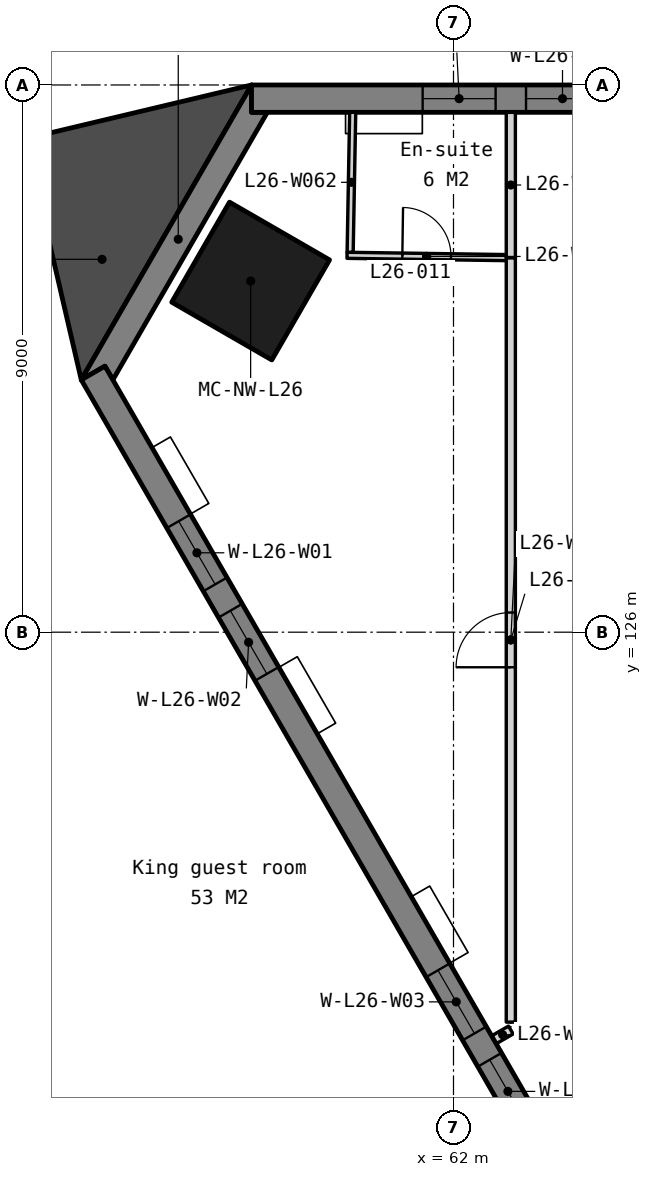
"""IFC4 building model, lengths in metres.
Left out: names, types, materials, properties, quantities, classifications, styles, units other than length and angle.
Written with IfcOpenShell. Run it as: python <this file> out.ifc"""

import sys

from ifc_helpers import new_model, si_unit, direction, frame, frame_2d, origin, origin_2d, place, context, subcontext, project, spatial, polyline, rectangle, outline, extrude, element, fill, save


model = new_model("IFC4")
c1 = context("Model", 3, precision=1e-05, world=origin(), true_north=direction((0.0, 1.0)))
c2 = subcontext(c1, "Body", "Model", "MODEL_VIEW")
j1 = project(units=[si_unit("LENGTHUNIT", "METRE"), si_unit("PLANEANGLEUNIT", "RADIAN")], contexts=[c1])
p1 = place(None, origin())
s1 = spatial("IfcSite", under=j1, at=p1, CompositionType="ELEMENT")
p2 = place(p1, origin())
s2 = spatial("IfcBuilding", under=s1, at=p2, CompositionType="ELEMENT")
p3 = place(p2, frame((0.0, 0.0, 106.3)))
s3 = spatial("IfcBuildingStorey", under=s2, at=p3, CompositionType="ELEMENT", Elevation=106.3)
p4 = place(p3, frame((58.664, 131.775, 0.0), z_axis=(0.0, 0.0, 1.0), x_axis=(-0.5, -0.866025403784, 0.0)))
e1 = element("IfcColumn", 1, at=p4, inside=s3, PredefinedType="COLUMN", context=c2, shape_type="SweptSolid", body=[
    extrude(rectangle(XDim=1.9, YDim=1.9, at=origin_2d()), origin(), (0.0, 0.0, 1.0), 3.5),
])
p5 = place(p3, frame((0.0, 0.0, -0.15)))
e2 = element("IfcWall", 2, at=p5, inside=s3, PredefinedType="SOLIDWALL", context=c2, shape_type="SweptSolid", body=[
    extrude(outline(polyline([(58.678, 135.0), (58.678, 134.55), (58.938, 134.55), (56.398, 130.15), (56.268, 130.375), (55.878, 130.15), (58.678, 135.0)])), origin(), (0.0, 0.0, 1.0), 3.5),
])
p6 = place(p3, frame((101.322, 134.775, -0.15), z_axis=(0.0, 0.0, 1.0), x_axis=(-1.0, 0.0, 0.0)))
e3 = element("IfcWall", 3, at=p6, inside=s3, PredefinedType="SOLIDWALL", context=c2, shape_type="SweptSolid", body=[
    extrude(outline(polyline([(42.643, 0.0), (42.643, 3.5), (0.0, 3.5), (0.0, 0.0), (42.643, 0.0)])), frame((0.0, 0.225, 0.0), z_axis=(0.0, -1.0, 0.0), x_axis=(1.0, 0.0, 0.0)), (0.0, 0.0, 1.0), 0.45),
])
p7 = place(p6, frame((2.814, 0.0, 1.05)))
e4 = element("IfcOpeningElement", 4, at=p7, cuts=e3, PredefinedType="OPENING", context=c2, shape_type="SweptSolid", body=[
    extrude(rectangle(XDim=1.2, YDim=1.5, at=frame_2d((0.6, 0.75))), frame((0.0, 0.235, 0.0), z_axis=(0.0, -1.0, 0.0), x_axis=(1.0, 0.0, 0.0)), (0.0, 0.0, 1.0), 0.47),
])
p8 = place(p6, frame((4.514, 0.0, 1.05)))
e5 = element("IfcOpeningElement", 5, at=p8, cuts=e3, PredefinedType="OPENING", context=c2, shape_type="SweptSolid", body=[
    extrude(rectangle(XDim=1.2, YDim=1.5, at=frame_2d((0.6, 0.75))), frame((0.0, 0.235, 0.0), z_axis=(0.0, -1.0, 0.0), x_axis=(1.0, 0.0, 0.0)), (0.0, 0.0, 1.0), 0.47),
])
p9 = place(p6, frame((11.343, 0.0, 1.05)))
e6 = element("IfcOpeningElement", 6, at=p9, cuts=e3, PredefinedType="OPENING", context=c2, shape_type="SweptSolid", body=[
    extrude(rectangle(XDim=1.2, YDim=1.5, at=frame_2d((0.6, 0.75))), frame((0.0, 0.235, 0.0), z_axis=(0.0, -1.0, 0.0), x_axis=(1.0, 0.0, 0.0)), (0.0, 0.0, 1.0), 0.47),
])
p10 = place(p6, frame((13.043, 0.0, 1.05)))
e7 = element("IfcOpeningElement", 7, at=p10, cuts=e3, PredefinedType="OPENING", context=c2, shape_type="SweptSolid", body=[
    extrude(rectangle(XDim=1.2, YDim=1.5, at=frame_2d((0.6, 0.75))), frame((0.0, 0.235, 0.0), z_axis=(0.0, -1.0, 0.0), x_axis=(1.0, 0.0, 0.0)), (0.0, 0.0, 1.0), 0.47),
])
p11 = place(p6, frame((19.872, 0.0, 1.05)))
e8 = element("IfcOpeningElement", 8, at=p11, cuts=e3, PredefinedType="OPENING", context=c2, shape_type="SweptSolid", body=[
    extrude(rectangle(XDim=1.2, YDim=1.5, at=frame_2d((0.6, 0.75))), frame((0.0, 0.235, 0.0), z_axis=(0.0, -1.0, 0.0), x_axis=(1.0, 0.0, 0.0)), (0.0, 0.0, 1.0), 0.47),
])
p12 = place(p6, frame((21.572, 0.0, 1.05)))
e9 = element("IfcOpeningElement", 9, at=p12, cuts=e3, PredefinedType="OPENING", context=c2, shape_type="SweptSolid", body=[
    extrude(rectangle(XDim=1.2, YDim=1.5, at=frame_2d((0.6, 0.75))), frame((0.0, 0.235, 0.0), z_axis=(0.0, -1.0, 0.0), x_axis=(1.0, 0.0, 0.0)), (0.0, 0.0, 1.0), 0.47),
])
p13 = place(p6, frame((28.4, 0.0, 1.05)))
e10 = element("IfcOpeningElement", 10, at=p13, cuts=e3, PredefinedType="OPENING", context=c2, shape_type="SweptSolid", body=[
    extrude(rectangle(XDim=1.2, YDim=1.5, at=frame_2d((0.6, 0.75))), frame((0.0, 0.235, 0.0), z_axis=(0.0, -1.0, 0.0), x_axis=(1.0, 0.0, 0.0)), (0.0, 0.0, 1.0), 0.47),
])
p14 = place(p6, frame((30.1, 0.0, 1.05)))
e11 = element("IfcOpeningElement", 11, at=p14, cuts=e3, PredefinedType="OPENING", context=c2, shape_type="SweptSolid", body=[
    extrude(rectangle(XDim=1.2, YDim=1.5, at=frame_2d((0.6, 0.75))), frame((0.0, 0.235, 0.0), z_axis=(0.0, -1.0, 0.0), x_axis=(1.0, 0.0, 0.0)), (0.0, 0.0, 1.0), 0.47),
])
p15 = place(p6, frame((36.929, 0.0, 1.05)))
e12 = element("IfcOpeningElement", 12, at=p15, cuts=e3, PredefinedType="OPENING", context=c2, shape_type="SweptSolid", body=[
    extrude(rectangle(XDim=1.2, YDim=1.5, at=frame_2d((0.6, 0.75))), frame((0.0, 0.235, 0.0), z_axis=(0.0, -1.0, 0.0), x_axis=(1.0, 0.0, 0.0)), (0.0, 0.0, 1.0), 0.47),
])
p16 = place(p6, frame((38.629, 0.0, 1.05)))
e13 = element("IfcOpeningElement", 13, at=p16, cuts=e3, PredefinedType="OPENING", context=c2, shape_type="SweptSolid", body=[
    extrude(rectangle(XDim=1.2, YDim=1.5, at=frame_2d((0.6, 0.75))), frame((0.0, 0.235, 0.0), z_axis=(0.0, -1.0, 0.0), x_axis=(1.0, 0.0, 0.0)), (0.0, 0.0, 1.0), 0.47),
])
p17 = place(p3, frame((56.073, 130.263, -0.15), z_axis=(0.0, 0.0, 1.0), x_axis=(0.500000478905, -0.866025127289, 0.0)))
e14 = element("IfcWall", 14, at=p17, inside=s3, PredefinedType="SOLIDWALL", context=c2, shape_type="SweptSolid", body=[
    extrude(outline(polyline([(42.643, 0.0), (42.643, 3.5), (0.0, 3.5), (0.0, 0.0), (42.643, 0.0)])), frame((0.0, 0.225, 0.0), z_axis=(0.0, -1.0, 0.0), x_axis=(1.0, 0.0, 0.0)), (0.0, 0.0, 1.0), 0.45),
])
p18 = place(p17, frame((2.814, 0.0, 1.05)))
e15 = element("IfcOpeningElement", 15, at=p18, cuts=e14, PredefinedType="OPENING", context=c2, shape_type="SweptSolid", body=[
    extrude(rectangle(XDim=1.2, YDim=1.5, at=frame_2d((0.6, 0.75))), frame((0.0, 0.235, 0.0), z_axis=(0.0, -1.0, 0.0), x_axis=(1.0, 0.0, 0.0)), (0.0, 0.0, 1.0), 0.47),
])
p19 = place(p17, frame((4.514, 0.0, 1.05)))
e16 = element("IfcOpeningElement", 16, at=p19, cuts=e14, PredefinedType="OPENING", context=c2, shape_type="SweptSolid", body=[
    extrude(rectangle(XDim=1.2, YDim=1.5, at=frame_2d((0.6, 0.75))), frame((0.0, 0.235, 0.0), z_axis=(0.0, -1.0, 0.0), x_axis=(1.0, 0.0, 0.0)), (0.0, 0.0, 1.0), 0.47),
])
p20 = place(p17, frame((11.343, 0.0, 1.05)))
e17 = element("IfcOpeningElement", 17, at=p20, cuts=e14, PredefinedType="OPENING", context=c2, shape_type="SweptSolid", body=[
    extrude(rectangle(XDim=1.2, YDim=1.5, at=frame_2d((0.6, 0.75))), frame((0.0, 0.235, 0.0), z_axis=(0.0, -1.0, 0.0), x_axis=(1.0, 0.0, 0.0)), (0.0, 0.0, 1.0), 0.47),
])
p21 = place(p17, frame((13.043, 0.0, 1.05)))
e18 = element("IfcOpeningElement", 18, at=p21, cuts=e14, PredefinedType="OPENING", context=c2, shape_type="SweptSolid", body=[
    extrude(rectangle(XDim=1.2, YDim=1.5, at=frame_2d((0.6, 0.75))), frame((0.0, 0.235, 0.0), z_axis=(0.0, -1.0, 0.0), x_axis=(1.0, 0.0, 0.0)), (0.0, 0.0, 1.0), 0.47),
])
p22 = place(p17, frame((19.872, 0.0, 1.05)))
e19 = element("IfcOpeningElement", 19, at=p22, cuts=e14, PredefinedType="OPENING", context=c2, shape_type="SweptSolid", body=[
    extrude(rectangle(XDim=1.2, YDim=1.5, at=frame_2d((0.6, 0.75))), frame((0.0, 0.235, 0.0), z_axis=(0.0, -1.0, 0.0), x_axis=(1.0, 0.0, 0.0)), (0.0, 0.0, 1.0), 0.47),
])
p23 = place(p17, frame((21.572, 0.0, 1.05)))
e20 = element("IfcOpeningElement", 20, at=p23, cuts=e14, PredefinedType="OPENING", context=c2, shape_type="SweptSolid", body=[
    extrude(rectangle(XDim=1.2, YDim=1.5, at=frame_2d((0.6, 0.75))), frame((0.0, 0.235, 0.0), z_axis=(0.0, -1.0, 0.0), x_axis=(1.0, 0.0, 0.0)), (0.0, 0.0, 1.0), 0.47),
])
p24 = place(p17, frame((28.4, 0.0, 1.05)))
e21 = element("IfcOpeningElement", 21, at=p24, cuts=e14, PredefinedType="OPENING", context=c2, shape_type="SweptSolid", body=[
    extrude(rectangle(XDim=1.2, YDim=1.5, at=frame_2d((0.6, 0.75))), frame((0.0, 0.235, 0.0), z_axis=(0.0, -1.0, 0.0), x_axis=(1.0, 0.0, 0.0)), (0.0, 0.0, 1.0), 0.47),
])
p25 = place(p17, frame((30.1, 0.0, 1.05)))
e22 = element("IfcOpeningElement", 22, at=p25, cuts=e14, PredefinedType="OPENING", context=c2, shape_type="SweptSolid", body=[
    extrude(rectangle(XDim=1.2, YDim=1.5, at=frame_2d((0.6, 0.75))), frame((0.0, 0.235, 0.0), z_axis=(0.0, -1.0, 0.0), x_axis=(1.0, 0.0, 0.0)), (0.0, 0.0, 1.0), 0.47),
])
p26 = place(p17, frame((36.929, 0.0, 1.05)))
e23 = element("IfcOpeningElement", 23, at=p26, cuts=e14, PredefinedType="OPENING", context=c2, shape_type="SweptSolid", body=[
    extrude(rectangle(XDim=1.2, YDim=1.5, at=frame_2d((0.6, 0.75))), frame((0.0, 0.235, 0.0), z_axis=(0.0, -1.0, 0.0), x_axis=(1.0, 0.0, 0.0)), (0.0, 0.0, 1.0), 0.47),
])
p27 = place(p17, frame((38.629, 0.0, 1.05)))
e24 = element("IfcOpeningElement", 24, at=p27, cuts=e14, PredefinedType="OPENING", context=c2, shape_type="SweptSolid", body=[
    extrude(rectangle(XDim=1.2, YDim=1.5, at=frame_2d((0.6, 0.75))), frame((0.0, 0.235, 0.0), z_axis=(0.0, -1.0, 0.0), x_axis=(1.0, 0.0, 0.0)), (0.0, 0.0, 1.0), 0.47),
])
p28 = place(p3, frame((0.0, 0.0, -0.15)))
e25 = element("IfcWall", 25, at=p28, inside=s3, PredefinedType="SOLIDWALL", context=c2, shape_type="SweptSolid", body=[
    extrude(outline(polyline([(58.678, 135.0), (54.958, 134.115), (55.878, 130.15), (58.678, 135.0)])), origin(), (0.0, 0.0, 1.0), 3.5),
])
p29 = place(p3, frame((62.673, 119.301, 0.0), z_axis=(0.0, 0.0, 1.0), x_axis=(0.866159461733, 0.499767732902, 0.0)))
e26 = element("IfcWall", 26, at=p29, inside=s3, PredefinedType="PARTITIONING", context=c2, shape_type="SweptSolid", body=[
    extrude(rectangle(XDim=0.311, YDim=0.15, at=frame_2d((0.156, 0.0))), origin(), (0.0, 0.0, 1.0), 3.35),
])
p30 = place(p3, frame((62.943, 119.587, 0.0), z_axis=(0.0, 0.0, 1.0), x_axis=(0.0, 1.0, 0.0)))
e27 = element("IfcWall", 27, at=p30, inside=s3, PredefinedType="PARTITIONING", context=c2, shape_type="SweptSolid", body=[
    extrude(rectangle(XDim=12.573, YDim=0.15, at=frame_2d((6.287, 0.0))), origin(), (0.0, 0.0, 1.0), 3.35),
])
p31 = place(p30, frame((5.836, 0.0, 0.0)))
e28 = element("IfcOpeningElement", 28, at=p31, cuts=e27, PredefinedType="OPENING", context=c2, shape_type="SweptSolid", body=[
    extrude(rectangle(XDim=0.9, YDim=2.1, at=frame_2d((0.45, 1.05))), frame((0.0, 0.085, 0.0), z_axis=(0.0, -1.0, 0.0), x_axis=(1.0, 0.0, 0.0)), (0.0, 0.0, 1.0), 0.17),
])
p32 = place(p3, frame((60.25, 132.198, 0.0), z_axis=(0.0, 0.0, 1.0), x_axis=(0.999895563634, -0.014452052626, 0.0)))
e29 = element("IfcWall", 29, at=p32, inside=s3, PredefinedType="PARTITIONING", context=c2, shape_type="SweptSolid", body=[
    extrude(rectangle(XDim=2.618, YDim=0.1, at=frame_2d((1.309, 0.0))), origin(), (0.0, 0.0, 1.0), 3.35),
])
p33 = place(p32, frame((0.909, 0.0, 0.0)))
e30 = element("IfcOpeningElement", 30, at=p33, cuts=e29, PredefinedType="OPENING", context=c2, shape_type="SweptSolid", body=[
    extrude(rectangle(XDim=0.8, YDim=2.1, at=frame_2d((0.4, 1.05))), frame((0.0, 0.06, 0.0), z_axis=(0.0, -1.0, 0.0), x_axis=(1.0, 0.0, 0.0)), (0.0, 0.0, 1.0), 0.12),
])
p34 = place(p3, frame((60.3, 132.248, 0.0), z_axis=(0.0, 0.0, 1.0), x_axis=(0.018236627382, 0.999833698883, 0.0)))
e31 = element("IfcWall", 31, at=p34, inside=s3, PredefinedType="PARTITIONING", context=c2, shape_type="SweptSolid", body=[
    extrude(rectangle(XDim=2.303, YDim=0.1, at=frame_2d((1.151, 0.0))), origin(), (0.0, 0.0, 1.0), 3.35),
])
p35 = place(p3, frame((62.943, 132.16, 0.0), z_axis=(0.0, 0.0, 1.0), x_axis=(0.0, 1.0, 0.0)))
e32 = element("IfcWall", 32, at=p35, inside=s3, PredefinedType="PARTITIONING", context=c2, shape_type="SweptSolid", body=[
    extrude(rectangle(XDim=2.39, YDim=0.15, at=frame_2d((1.195, 0.0))), origin(), (0.0, 0.0, 1.0), 3.35),
])
p36 = place(p15, origin())
e33 = element("IfcWindow", 33, at=p36, inside=s3, PartitioningType="SINGLE_PANEL", PredefinedType="WINDOW", context=c2, shape_type="SweptSolid", body=[
    extrude(rectangle(XDim=1.2, YDim=1.5, at=frame_2d((0.6, 0.75))), frame((0.0, 0.03, 0.0), z_axis=(0.0, -1.0, 0.0), x_axis=(1.0, 0.0, 0.0)), (0.0, 0.0, 1.0), 0.06),
])
fill(e12, e33)
p37 = place(p16, origin())
e34 = element("IfcWindow", 34, at=p37, inside=s3, PartitioningType="SINGLE_PANEL", PredefinedType="WINDOW", context=c2, shape_type="SweptSolid", body=[
    extrude(rectangle(XDim=1.2, YDim=1.5, at=frame_2d((0.6, 0.75))), frame((0.0, 0.03, 0.0), z_axis=(0.0, -1.0, 0.0), x_axis=(1.0, 0.0, 0.0)), (0.0, 0.0, 1.0), 0.06),
])
fill(e13, e34)
p38 = place(p18, origin())
e35 = element("IfcWindow", 35, at=p38, inside=s3, PartitioningType="SINGLE_PANEL", PredefinedType="WINDOW", context=c2, shape_type="SweptSolid", body=[
    extrude(rectangle(XDim=1.2, YDim=1.5, at=frame_2d((0.6, 0.75))), frame((0.0, 0.03, 0.0), z_axis=(0.0, -1.0, 0.0), x_axis=(1.0, 0.0, 0.0)), (0.0, 0.0, 1.0), 0.06),
])
fill(e15, e35)
p39 = place(p19, origin())
e36 = element("IfcWindow", 36, at=p39, inside=s3, PartitioningType="SINGLE_PANEL", PredefinedType="WINDOW", context=c2, shape_type="SweptSolid", body=[
    extrude(rectangle(XDim=1.2, YDim=1.5, at=frame_2d((0.6, 0.75))), frame((0.0, 0.03, 0.0), z_axis=(0.0, -1.0, 0.0), x_axis=(1.0, 0.0, 0.0)), (0.0, 0.0, 1.0), 0.06),
])
fill(e16, e36)
p40 = place(p20, origin())
e37 = element("IfcWindow", 37, at=p40, inside=s3, PartitioningType="SINGLE_PANEL", PredefinedType="WINDOW", context=c2, shape_type="SweptSolid", body=[
    extrude(rectangle(XDim=1.2, YDim=1.5, at=frame_2d((0.6, 0.75))), frame((0.0, 0.03, 0.0), z_axis=(0.0, -1.0, 0.0), x_axis=(1.0, 0.0, 0.0)), (0.0, 0.0, 1.0), 0.06),
])
fill(e17, e37)
p41 = place(p21, origin())
e38 = element("IfcWindow", 38, at=p41, inside=s3, PartitioningType="SINGLE_PANEL", PredefinedType="WINDOW", context=c2, shape_type="SweptSolid", body=[
    extrude(rectangle(XDim=1.2, YDim=1.5, at=frame_2d((0.6, 0.75))), frame((0.0, 0.03, 0.0), z_axis=(0.0, -1.0, 0.0), x_axis=(1.0, 0.0, 0.0)), (0.0, 0.0, 1.0), 0.06),
])
fill(e18, e38)
p42 = place(p31, origin())
e39 = element("IfcDoor", 39, at=p42, inside=s3, OperationType="SINGLE_SWING_LEFT", PredefinedType="DOOR", context=c2, shape_type="SweptSolid", body=[
    extrude(rectangle(XDim=0.9, YDim=2.1, at=frame_2d((0.45, 1.05))), frame((0.0, 0.025, 0.0), z_axis=(0.0, -1.0, 0.0), x_axis=(1.0, 0.0, 0.0)), (0.0, 0.0, 1.0), 0.05),
])
fill(e28, e39)
p43 = place(p33, origin())
e40 = element("IfcDoor", 40, at=p43, inside=s3, OperationType="SINGLE_SWING_LEFT", PredefinedType="DOOR", context=c2, shape_type="SweptSolid", body=[
    extrude(rectangle(XDim=0.8, YDim=2.1, at=frame_2d((0.4, 1.05))), frame((0.0, 0.025, 0.0), z_axis=(0.0, -1.0, 0.0), x_axis=(1.0, 0.0, 0.0)), (0.0, 0.0, 1.0), 0.05),
])
fill(e30, e40)
save(model, sys.argv[1])
